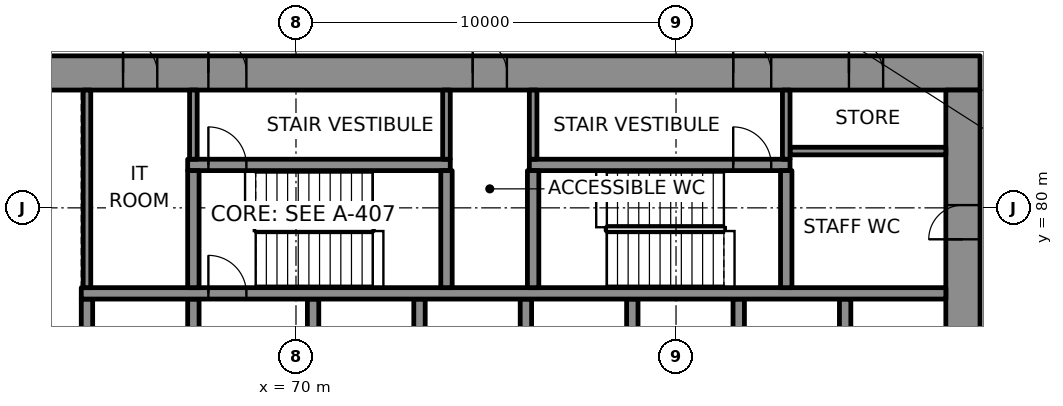
"""IFC4 building model, lengths in metres.
Left out: names, types, materials, properties, quantities, classifications, styles, units other than length and angle.
Written with IfcOpenShell. Run it as: python <this file> out.ifc"""

import sys

from ifc_helpers import new_model, si_unit, direction, frame, frame_2d, origin, place, context, subcontext, project, spatial, rectangle, extrude, element, fill, save


model = new_model("IFC4")
c1 = context("Model", 3, precision=1e-05, world=origin(), true_north=direction((0.0, 1.0)))
c2 = subcontext(c1, "Body", "Model", "MODEL_VIEW")
j1 = project(units=[si_unit("LENGTHUNIT", "METRE"), si_unit("PLANEANGLEUNIT", "RADIAN")], contexts=[c1])
p1 = place(None, origin())
s1 = spatial("IfcSite", under=j1, at=p1, CompositionType="ELEMENT")
p2 = place(p1, origin())
s2 = spatial("IfcBuilding", under=s1, at=p2, CompositionType="ELEMENT")
p3 = place(p2, frame((0.0, 0.0, 98.8)))
s3 = spatial("IfcBuildingStorey", under=s2, at=p3, CompositionType="ELEMENT", Elevation=98.8)
p4 = place(p3, frame((62.0, 83.55, 0.0), z_axis=(0.0, 0.0, 1.0), x_axis=(1.0, 0.0, 0.0)))
e1 = element("IfcWall", 1, at=p4, inside=s3, PredefinedType="SHEAR", context=c2, shape_type="SweptSolid", body=[
    extrude(rectangle(XDim=26.0, YDim=0.9, at=frame_2d((13.0, 0.0))), origin(), (0.0, 0.0, 1.0), 4.0),
])
p5 = place(p4, frame((5.695, 0.0, 0.0)))
e2 = element("IfcOpeningElement", 2, at=p5, cuts=e1, PredefinedType="OPENING", context=c2, shape_type="SweptSolid", body=[
    extrude(rectangle(XDim=1.0, YDim=2.1, at=frame_2d((0.5, 1.05))), frame((0.0, 0.46, 0.0), z_axis=(0.0, -1.0, 0.0), x_axis=(1.0, 0.0, 0.0)), (0.0, 0.0, 1.0), 0.92),
])
p6 = place(p4, frame((19.505, 0.0, 0.0)))
e3 = element("IfcOpeningElement", 3, at=p6, cuts=e1, PredefinedType="OPENING", context=c2, shape_type="SweptSolid", body=[
    extrude(rectangle(XDim=1.0, YDim=2.1, at=frame_2d((0.5, 1.05))), frame((0.0, 0.46, 0.0), z_axis=(0.0, -1.0, 0.0), x_axis=(1.0, 0.0, 0.0)), (0.0, 0.0, 1.0), 0.92),
])
p7 = place(p4, frame((3.45, 0.0, 0.0)))
e4 = element("IfcOpeningElement", 4, at=p7, cuts=e1, PredefinedType="OPENING", context=c2, shape_type="SweptSolid", body=[
    extrude(rectangle(XDim=0.9, YDim=2.1, at=frame_2d((0.45, 1.05))), frame((0.0, 0.46, 0.0), z_axis=(0.0, -1.0, 0.0), x_axis=(1.0, 0.0, 0.0)), (0.0, 0.0, 1.0), 0.92),
])
p8 = place(p4, frame((12.65, 0.0, 0.0)))
e5 = element("IfcOpeningElement", 5, at=p8, cuts=e1, PredefinedType="OPENING", context=c2, shape_type="SweptSolid", body=[
    extrude(rectangle(XDim=0.9, YDim=2.1, at=frame_2d((0.45, 1.05))), frame((0.0, 0.46, 0.0), z_axis=(0.0, -1.0, 0.0), x_axis=(1.0, 0.0, 0.0)), (0.0, 0.0, 1.0), 0.92),
])
p9 = place(p4, frame((22.55, 0.0, 0.0)))
e6 = element("IfcOpeningElement", 6, at=p9, cuts=e1, PredefinedType="OPENING", context=c2, shape_type="SweptSolid", body=[
    extrude(rectangle(XDim=0.9, YDim=2.1, at=frame_2d((0.45, 1.05))), frame((0.0, 0.46, 0.0), z_axis=(0.0, -1.0, 0.0), x_axis=(1.0, 0.0, 0.0)), (0.0, 0.0, 1.0), 0.92),
])
p10 = place(p3, frame((87.55, 66.9, 0.0), z_axis=(0.0, 0.0, 1.0), x_axis=(0.0, 1.0, 0.0)))
e7 = element("IfcWall", 7, at=p10, inside=s3, PredefinedType="SHEAR", context=c2, shape_type="SweptSolid", body=[
    extrude(rectangle(XDim=16.2, YDim=0.9, at=frame_2d((8.1, 0.0))), origin(), (0.0, 0.0, 1.0), 4.0),
])
p11 = place(p10, frame((5.5, 0.0, 0.0)))
e8 = element("IfcOpeningElement", 8, at=p11, cuts=e7, PredefinedType="OPENING", context=c2, shape_type="SweptSolid", body=[
    extrude(rectangle(XDim=1.8, YDim=2.1, at=frame_2d((0.9, 1.05))), frame((0.0, 0.46, 0.0), z_axis=(0.0, -1.0, 0.0), x_axis=(1.0, 0.0, 0.0)), (0.0, 0.0, 1.0), 0.92),
])
p12 = place(p10, frame((12.272, 0.0, 0.0)))
e9 = element("IfcOpeningElement", 9, at=p12, cuts=e7, PredefinedType="OPENING", context=c2, shape_type="SweptSolid", body=[
    extrude(rectangle(XDim=0.9, YDim=2.1, at=frame_2d((0.45, 1.05))), frame((0.0, 0.46, 0.0), z_axis=(0.0, -1.0, 0.0), x_axis=(1.0, 0.0, 0.0)), (0.0, 0.0, 1.0), 0.92),
])
for number, where, z_axis, x_axis in (
    (10, (64.5, 75.0, 0.0), (0.0, 0.0, 1.0), (0.0, 1.0, 0.0)),
    (11, (67.3, 75.0, 0.0), (0.0, 0.0, 1.0), (0.0, 1.0, 0.0)),
):
    element("IfcWall", number, at=place(p3, frame(where, z_axis=z_axis, x_axis=x_axis)), inside=s3, PredefinedType="SHEAR", context=c2, shape_type="SweptSolid", body=[
        extrude(rectangle(XDim=2.6, YDim=0.3, at=frame_2d((1.3, 0.0))), origin(), (0.0, 0.0, 1.0), 4.0),
    ])
p13 = place(p3, frame((70.45, 75.0, 0.0), z_axis=(0.0, 0.0, 1.0), x_axis=(0.0, 1.0, 0.0)))
e12 = element("IfcWall", 12, at=p13, inside=s3, PredefinedType="SHEAR", context=c2, shape_type="SweptSolid", body=[
    extrude(rectangle(XDim=2.6, YDim=0.3, at=frame_2d((1.3, 0.0))), origin(), (0.0, 0.0, 1.0), 4.0),
])
p14 = place(p13, frame((0.15, 0.0, 0.0)))
e13 = element("IfcOpeningElement", 13, at=p14, cuts=e12, PredefinedType="OPENING", context=c2, shape_type="SweptSolid", body=[
    extrude(rectangle(XDim=1.1, YDim=2.1, at=frame_2d((0.55, 1.05))), frame((0.0, 0.16, 0.0), z_axis=(0.0, -1.0, 0.0), x_axis=(1.0, 0.0, 0.0)), (0.0, 0.0, 1.0), 0.32),
])
for number, where, z_axis, x_axis in (
    (14, (73.25, 75.0, 0.0), (0.0, 0.0, 1.0), (0.0, 1.0, 0.0)),
    (15, (76.05, 75.0, 0.0), (0.0, 0.0, 1.0), (0.0, 1.0, 0.0)),
    (16, (78.85, 75.0, 0.0), (0.0, 0.0, 1.0), (0.0, 1.0, 0.0)),
    (17, (81.65, 75.0, 0.0), (0.0, 0.0, 1.0), (0.0, 1.0, 0.0)),
    (18, (84.45, 75.0, 0.0), (0.0, 0.0, 1.0), (0.0, 1.0, 0.0)),
):
    element("IfcWall", number, at=place(p3, frame(where, z_axis=z_axis, x_axis=x_axis)), inside=s3, PredefinedType="SHEAR", context=c2, shape_type="SweptSolid", body=[
        extrude(rectangle(XDim=2.6, YDim=0.3, at=frame_2d((1.3, 0.0))), origin(), (0.0, 0.0, 1.0), 4.0),
    ])
p15 = place(p3, frame((64.35, 77.75, 0.0), z_axis=(0.0, 0.0, 1.0), x_axis=(1.0, 0.0, 0.0)))
e19 = element("IfcWall", 19, at=p15, inside=s3, PredefinedType="SHEAR", context=c2, shape_type="SweptSolid", body=[
    extrude(rectangle(XDim=22.75, YDim=0.3, at=frame_2d((11.375, 0.0))), origin(), (0.0, 0.0, 1.0), 4.0),
])
p16 = place(p15, frame((3.345, 0.0, 0.0)))
e20 = element("IfcOpeningElement", 20, at=p16, cuts=e19, PredefinedType="OPENING", context=c2, shape_type="SweptSolid", body=[
    extrude(rectangle(XDim=1.0, YDim=2.1, at=frame_2d((0.5, 1.05))), frame((0.0, 0.16, 0.0), z_axis=(0.0, -1.0, 0.0), x_axis=(1.0, 0.0, 0.0)), (0.0, 0.0, 1.0), 0.32),
])
p17 = place(p3, frame((67.15, 81.13, 0.0), z_axis=(0.0, 0.0, 1.0), x_axis=(1.0, 0.0, 0.0)))
e21 = element("IfcWall", 21, at=p17, inside=s3, PredefinedType="SHEAR", context=c2, shape_type="SweptSolid", body=[
    extrude(rectangle(XDim=6.91, YDim=0.3, at=frame_2d((3.455, 0.0))), origin(), (0.0, 0.0, 1.0), 4.0),
])
p18 = place(p17, frame((0.545, 0.0, 0.0)))
e22 = element("IfcOpeningElement", 22, at=p18, cuts=e21, PredefinedType="OPENING", context=c2, shape_type="SweptSolid", body=[
    extrude(rectangle(XDim=1.0, YDim=2.1, at=frame_2d((0.5, 1.05))), frame((0.0, 0.16, 0.0), z_axis=(0.0, -1.0, 0.0), x_axis=(1.0, 0.0, 0.0)), (0.0, 0.0, 1.0), 0.32),
])
p19 = place(p3, frame((76.14, 81.13, 0.0), z_axis=(0.0, 0.0, 1.0), x_axis=(1.0, 0.0, 0.0)))
e23 = element("IfcWall", 23, at=p19, inside=s3, PredefinedType="SHEAR", context=c2, shape_type="SweptSolid", body=[
    extrude(rectangle(XDim=6.86, YDim=0.3, at=frame_2d((3.43, 0.0))), origin(), (0.0, 0.0, 1.0), 4.0),
])
p20 = place(p19, frame((5.365, 0.0, 0.0)))
e24 = element("IfcOpeningElement", 24, at=p20, cuts=e23, PredefinedType="OPENING", context=c2, shape_type="SweptSolid", body=[
    extrude(rectangle(XDim=1.0, YDim=2.1, at=frame_2d((0.5, 1.05))), frame((0.0, 0.16, 0.0), z_axis=(0.0, -1.0, 0.0), x_axis=(1.0, 0.0, 0.0)), (0.0, 0.0, 1.0), 0.32),
])
for number, where, z_axis, x_axis in (
    (25, (67.3, 77.9, 0.0), (0.0, 0.0, 1.0), (0.0, 1.0, 0.0)),
    (26, (73.96, 77.9, 0.0), (0.0, 0.0, 1.0), (0.0, 1.0, 0.0)),
    (27, (76.24, 77.9, 0.0), (0.0, 0.0, 1.0), (0.0, 1.0, 0.0)),
    (28, (82.9, 77.9, 0.0), (0.0, 0.0, 1.0), (0.0, 1.0, 0.0)),
):
    element("IfcWall", number, at=place(p3, frame(where, z_axis=z_axis, x_axis=x_axis)), inside=s3, PredefinedType="SHEAR", context=c2, shape_type="SweptSolid", body=[
        extrude(rectangle(XDim=3.08, YDim=0.3, at=frame_2d((1.54, 0.0))), origin(), (0.0, 0.0, 1.0), 4.0),
    ])
p21 = place(p3, frame((83.0, 81.495, 0.0), z_axis=(0.0, 0.0, 1.0), x_axis=(1.0, 0.0, 0.0)))
e29 = element("IfcWall", 29, at=p21, inside=s3, PredefinedType="PARTITIONING", context=c2, shape_type="SweptSolid", body=[
    extrude(rectangle(XDim=4.1, YDim=0.2, at=frame_2d((2.05, 0.0))), origin(), (0.0, 0.0, 1.0), 4.0),
])
p22 = place(p3, frame((64.5, 77.9, 0.0), z_axis=(0.0, 0.0, 1.0), x_axis=(0.0, 1.0, 0.0)))
e30 = element("IfcWall", 30, at=p22, inside=s3, PredefinedType="PARTITIONING", context=c2, shape_type="SweptSolid", body=[
    extrude(rectangle(XDim=5.2, YDim=0.2, at=frame_2d((2.6, 0.0))), origin(), (0.0, 0.0, 1.0), 4.0),
])
for number, where, z_axis, x_axis in (
    (31, (67.3, 81.28, 0.0), (0.0, 0.0, 1.0), (0.0, 1.0, 0.0)),
    (32, (73.96, 81.28, 0.0), (0.0, 0.0, 1.0), (0.0, 1.0, 0.0)),
    (33, (76.24, 81.28, 0.0), (0.0, 0.0, 1.0), (0.0, 1.0, 0.0)),
    (34, (82.9, 81.28, 0.0), (0.0, 0.0, 1.0), (0.0, 1.0, 0.0)),
):
    element("IfcWall", number, at=place(p3, frame(where, z_axis=z_axis, x_axis=x_axis)), inside=s3, PredefinedType="PARTITIONING", context=c2, shape_type="SweptSolid", body=[
        extrude(rectangle(XDim=1.82, YDim=0.2, at=frame_2d((0.91, 0.0))), origin(), (0.0, 0.0, 1.0), 4.0),
    ])
p23 = place(p16, origin())
e35 = element("IfcDoor", 35, at=p23, inside=s3, OperationType="SINGLE_SWING_LEFT", PredefinedType="DOOR", context=c2, shape_type="SweptSolid", body=[
    extrude(rectangle(XDim=1.0, YDim=2.1, at=frame_2d((0.5, 1.05))), frame((0.0, 0.025, 0.0), z_axis=(0.0, -1.0, 0.0), x_axis=(1.0, 0.0, 0.0)), (0.0, 0.0, 1.0), 0.05),
])
fill(e20, e35)
p24 = place(p18, origin())
e36 = element("IfcDoor", 36, at=p24, inside=s3, OperationType="SINGLE_SWING_RIGHT", PredefinedType="DOOR", context=c2, shape_type="SweptSolid", body=[
    extrude(rectangle(XDim=1.0, YDim=2.1, at=frame_2d((0.5, 1.05))), frame((0.0, 0.025, 0.0), z_axis=(0.0, -1.0, 0.0), x_axis=(1.0, 0.0, 0.0)), (0.0, 0.0, 1.0), 0.05),
])
fill(e22, e36)
p25 = place(p5, origin())
e37 = element("IfcDoor", 37, at=p25, inside=s3, OperationType="SINGLE_SWING_LEFT", PredefinedType="DOOR", context=c2, shape_type="SweptSolid", body=[
    extrude(rectangle(XDim=1.0, YDim=2.1, at=frame_2d((0.5, 1.05))), frame((0.0, 0.17, 0.0), z_axis=(0.0, -1.0, 0.0), x_axis=(1.0, 0.0, 0.0)), (0.0, 0.0, 1.0), 0.34),
])
fill(e2, e37)
p26 = place(p20, origin())
e38 = element("IfcDoor", 38, at=p26, inside=s3, OperationType="SINGLE_SWING_RIGHT", PredefinedType="DOOR", context=c2, shape_type="SweptSolid", body=[
    extrude(rectangle(XDim=1.0, YDim=2.1, at=frame_2d((0.5, 1.05))), frame((0.0, 0.025, 0.0), z_axis=(0.0, -1.0, 0.0), x_axis=(1.0, 0.0, 0.0)), (0.0, 0.0, 1.0), 0.05),
])
fill(e24, e38)
p27 = place(p6, origin())
e39 = element("IfcDoor", 39, at=p27, inside=s3, OperationType="SINGLE_SWING_LEFT", PredefinedType="DOOR", context=c2, shape_type="SweptSolid", body=[
    extrude(rectangle(XDim=1.0, YDim=2.1, at=frame_2d((0.5, 1.05))), frame((0.0, 0.17, 0.0), z_axis=(0.0, -1.0, 0.0), x_axis=(1.0, 0.0, 0.0)), (0.0, 0.0, 1.0), 0.34),
])
fill(e3, e39)
p28 = place(p7, origin())
e40 = element("IfcDoor", 40, at=p28, inside=s3, OperationType="SINGLE_SWING_RIGHT", PredefinedType="DOOR", context=c2, shape_type="SweptSolid", body=[
    extrude(rectangle(XDim=0.9, YDim=2.1, at=frame_2d((0.45, 1.05))), frame((0.0, 0.17, 0.0), z_axis=(0.0, -1.0, 0.0), x_axis=(1.0, 0.0, 0.0)), (0.0, 0.0, 1.0), 0.34),
])
fill(e4, e40)
p29 = place(p8, origin())
e41 = element("IfcDoor", 41, at=p29, inside=s3, OperationType="SINGLE_SWING_LEFT", PredefinedType="DOOR", context=c2, shape_type="SweptSolid", body=[
    extrude(rectangle(XDim=0.9, YDim=2.1, at=frame_2d((0.45, 1.05))), frame((0.0, 0.17, 0.0), z_axis=(0.0, -1.0, 0.0), x_axis=(1.0, 0.0, 0.0)), (0.0, 0.0, 1.0), 0.34),
])
fill(e5, e41)
p30 = place(p12, origin())
e42 = element("IfcDoor", 42, at=p30, inside=s3, OperationType="SINGLE_SWING_RIGHT", PredefinedType="DOOR", context=c2, shape_type="SweptSolid", body=[
    extrude(rectangle(XDim=0.9, YDim=2.1, at=frame_2d((0.45, 1.05))), frame((0.0, 0.17, 0.0), z_axis=(0.0, -1.0, 0.0), x_axis=(1.0, 0.0, 0.0)), (0.0, 0.0, 1.0), 0.34),
])
fill(e9, e42)
p31 = place(p9, origin())
e43 = element("IfcDoor", 43, at=p31, inside=s3, OperationType="SINGLE_SWING_LEFT", PredefinedType="DOOR", context=c2, shape_type="SweptSolid", body=[
    extrude(rectangle(XDim=0.9, YDim=2.1, at=frame_2d((0.45, 1.05))), frame((0.0, 0.17, 0.0), z_axis=(0.0, -1.0, 0.0), x_axis=(1.0, 0.0, 0.0)), (0.0, 0.0, 1.0), 0.34),
])
fill(e6, e43)
save(model, sys.argv[1])
